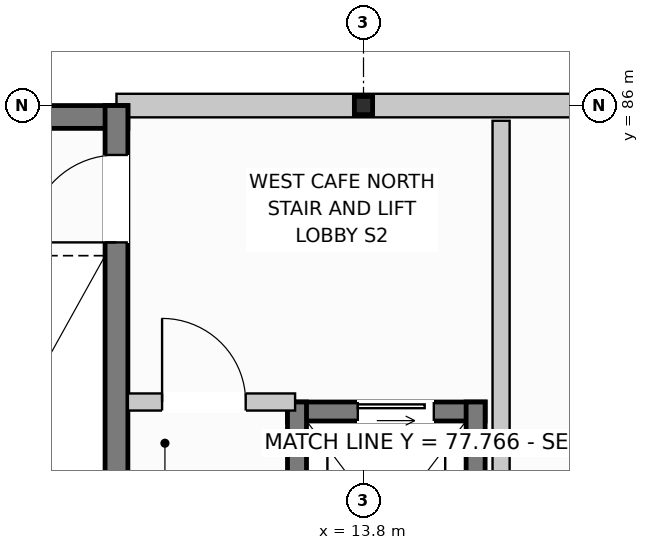
"""IFC4 building model, lengths in metres.
Left out: names, types, materials, properties, quantities, classifications, styles, units other than length and angle.
Written with IfcOpenShell. Run it as: python <this file> out.ifc"""

import sys

from ifc_helpers import new_model, si_unit, direction, frame, frame_2d, origin, origin_with_axes, origin_2d, place, context, subcontext, project, spatial, rectangle, i_section, extrude, element, fill, save


model = new_model("IFC4")
c1 = context("Model", 3, precision=1e-05, world=origin(), true_north=direction((0.0, 1.0)))
c2 = subcontext(c1, "Body", "Model", "MODEL_VIEW")
j1 = project(units=[si_unit("LENGTHUNIT", "METRE"), si_unit("PLANEANGLEUNIT", "RADIAN")], contexts=[c1])
p1 = place(None, origin())
s1 = spatial("IfcSite", under=j1, at=p1, CompositionType="ELEMENT")
p2 = place(p1, origin())
s2 = spatial("IfcBuilding", under=s1, at=p2, CompositionType="ELEMENT")
p3 = place(p2, frame((0.0, 0.0, 8.0)))
s3 = spatial("IfcBuildingStorey", under=s2, at=p3, CompositionType="ELEMENT", Elevation=8.0)
p4 = place(p3, frame((13.8, 86.0, 0.0), z_axis=(0.0, 0.0, 1.0), x_axis=(1.0, 0.0, 0.0)))
e1 = element("IfcColumn", 1, at=p4, inside=s3, PredefinedType="COLUMN", context=c2, shape_type="SweptSolid", body=[
    extrude(i_section(OverallWidth=0.24, OverallDepth=0.24, WebThickness=0.01, FlangeThickness=0.017, at=origin_2d()), origin(), (0.0, 0.0, 1.0), 3.2),
])
p5 = place(p3, frame((10.55, 86.0, 0.0), z_axis=(0.0, 0.0, 1.0), x_axis=(1.0, 0.0, 0.0)))
e2 = element("IfcWall", 2, at=p5, inside=s3, PredefinedType="STANDARD", context=c2, shape_type="SweptSolid", body=[
    extrude(rectangle(XDim=10.15, YDim=0.31, at=frame_2d((5.075, 0.0))), origin(), (0.0, 0.0, 1.0), 2.62),
])
p6 = place(p5, frame((6.925, 0.0, 0.72)))
e3 = element("IfcOpeningElement", 3, at=p6, cuts=e2, PredefinedType="OPENING", context=c2, shape_type="SweptSolid", body=[
    extrude(rectangle(XDim=1.35, YDim=1.6, at=frame_2d((0.675, 0.8))), frame((0.0, 0.167, 0.0), z_axis=(0.0, -1.0, 0.0), x_axis=(1.0, 0.0, 0.0)), (0.0, 0.0, 1.0), 0.334),
])
p7 = place(p3, frame((7.2, 85.85, 0.0), z_axis=(0.0, 0.0, 1.0), x_axis=(1.0, 0.0, 0.0)))
e4 = element("IfcWall", 4, at=p7, inside=s3, PredefinedType="SHEAR", context=c2, shape_type="SweptSolid", body=[
    extrude(rectangle(XDim=3.5, YDim=0.3, at=frame_2d((1.75, 0.0))), origin(), (0.0, 0.0, 1.0), 2.94),
])
p8 = place(p3, frame((10.55, 78.5, 0.0), z_axis=(0.0, 0.0, 1.0), x_axis=(0.0, 1.0, 0.0)))
e5 = element("IfcWall", 5, at=p8, inside=s3, PredefinedType="SHEAR", context=c2, shape_type="SweptSolid", body=[
    extrude(rectangle(XDim=7.5, YDim=0.3, at=frame_2d((3.75, 0.0))), origin(), (0.0, 0.0, 1.0), 2.94),
])
p9 = place(p8, frame((5.7, 0.0, 0.0)))
e6 = element("IfcOpeningElement", 6, at=p9, cuts=e5, PredefinedType="OPENING", context=c2, shape_type="SweptSolid", body=[
    extrude(rectangle(XDim=1.15, YDim=2.15, at=frame_2d((0.575, 1.075))), frame((0.0, 0.162, 0.0), z_axis=(0.0, -1.0, 0.0), x_axis=(1.0, 0.0, 0.0)), (0.0, 0.0, 1.0), 0.324),
])
p10 = place(p3, frame((12.8, 81.975, 0.0), z_axis=(0.0, 0.0, 1.0), x_axis=(1.0, 0.0, 0.0)))
e7 = element("IfcWall", 7, at=p10, inside=s3, PredefinedType="SHEAR", context=c2, shape_type="SweptSolid", body=[
    extrude(rectangle(XDim=2.6, YDim=0.25, at=frame_2d((1.3, 0.0))), origin(), (0.0, 0.0, 1.0), 2.94),
])
p11 = place(p10, frame((0.925, 0.0, 0.0)))
e8 = element("IfcOpeningElement", 8, at=p11, cuts=e7, PredefinedType="OPENING", context=c2, shape_type="SweptSolid", body=[
    extrude(rectangle(XDim=1.0, YDim=2.1, at=frame_2d((0.5, 1.05))), frame((0.0, 0.137, 0.0), z_axis=(0.0, -1.0, 0.0), x_axis=(1.0, 0.0, 0.0)), (0.0, 0.0, 1.0), 0.274),
])
for number, where, z_axis, x_axis in (
    (9, (12.925, 78.85, 0.0), (0.0, 0.0, 1.0), (0.0, 1.0, 0.0)),
    (10, (15.275, 78.85, 0.0), (0.0, 0.0, 1.0), (0.0, 1.0, 0.0)),
):
    element("IfcWall", number, at=place(p3, frame(where, z_axis=z_axis, x_axis=x_axis)), inside=s3, PredefinedType="SHEAR", context=c2, shape_type="SweptSolid", body=[
        extrude(rectangle(XDim=3.25, YDim=0.25, at=frame_2d((1.625, 0.0))), origin(), (0.0, 0.0, 1.0), 2.94),
    ])
p12 = place(p3, frame((15.61, 78.2, 0.0), z_axis=(0.0, 0.0, 1.0), x_axis=(0.0, 1.0, 0.0)))
e11 = element("IfcWall", 11, at=p12, inside=s3, PredefinedType="PARTITIONING", context=c2, shape_type="SweptSolid", body=[
    extrude(rectangle(XDim=7.6, YDim=0.225, at=frame_2d((3.8, 0.0))), origin(), (0.0, 0.0, 1.0), 2.94),
])
p13 = place(p3, frame((10.7, 82.1, 0.0), z_axis=(0.0, 0.0, 1.0), x_axis=(1.0, 0.0, 0.0)))
e12 = element("IfcWall", 12, at=p13, inside=s3, PredefinedType="PARTITIONING", context=c2, shape_type="SweptSolid", body=[
    extrude(rectangle(XDim=2.2, YDim=0.225, at=frame_2d((1.1, 0.0))), origin(), (0.0, 0.0, 1.0), 2.94),
])
p14 = place(p13, frame((0.45, 0.0, 0.0)))
e13 = element("IfcOpeningElement", 13, at=p14, cuts=e12, PredefinedType="OPENING", context=c2, shape_type="SweptSolid", body=[
    extrude(rectangle(XDim=1.1, YDim=2.15, at=frame_2d((0.55, 1.075))), frame((0.0, 0.125, 0.0), z_axis=(0.0, -1.0, 0.0), x_axis=(1.0, 0.0, 0.0)), (0.0, 0.0, 1.0), 0.249),
])
p15 = place(p9, origin_with_axes())
e14 = element("IfcDoor", 14, at=p15, inside=s3, OperationType="SINGLE_SWING_LEFT", PredefinedType="DOOR", context=c2, shape_type="SweptSolid", body=[
    extrude(rectangle(XDim=1.15, YDim=2.15, at=frame_2d((0.575, 1.075))), frame((0.0, 0.025, 0.0), z_axis=(0.0, -1.0, 0.0), x_axis=(1.0, 0.0, 0.0)), (0.0, 0.0, 1.0), 0.05),
])
fill(e6, e14)
p16 = place(p11, origin_with_axes())
e15 = element("IfcDoor", 15, at=p16, inside=s3, OperationType="SLIDING_TO_LEFT", PredefinedType="DOOR", context=c2, shape_type="SweptSolid", body=[
    extrude(rectangle(XDim=1.0, YDim=2.1, at=frame_2d((0.5, 1.05))), frame((0.0, 0.025, 0.0), z_axis=(0.0, -1.0, 0.0), x_axis=(1.0, 0.0, 0.0)), (0.0, 0.0, 1.0), 0.05),
])
fill(e8, e15)
p17 = place(p14, origin_with_axes())
e16 = element("IfcDoor", 16, at=p17, inside=s3, OperationType="SINGLE_SWING_LEFT", PredefinedType="DOOR", context=c2, shape_type="SweptSolid", body=[
    extrude(rectangle(XDim=1.1, YDim=2.15, at=frame_2d((0.55, 1.075))), frame((0.0, 0.025, 0.0), z_axis=(0.0, -1.0, 0.0), x_axis=(1.0, 0.0, 0.0)), (0.0, 0.0, 1.0), 0.05),
])
fill(e13, e16)
save(model, sys.argv[1])
